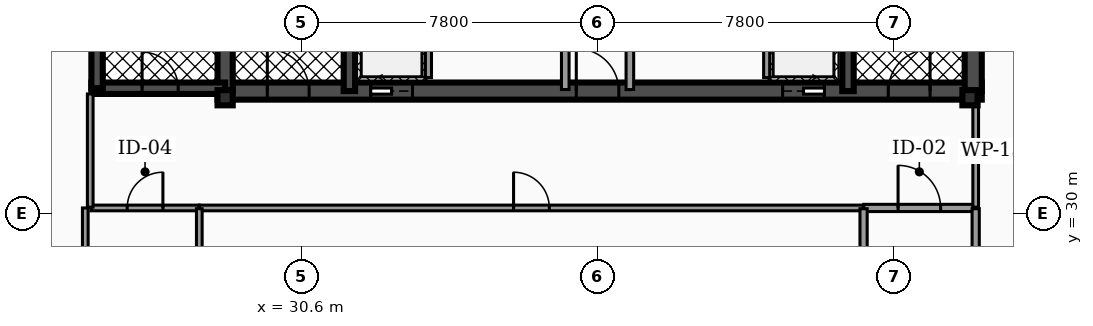
"""IFC4 building model, lengths in metres.
Left out: names, types, materials, properties, quantities, classifications, styles, units other than length and angle.
Written with IfcOpenShell. Run it as: python <this file> out.ifc"""

import sys

from ifc_helpers import new_model, si_unit, direction, frame, frame_2d, origin, origin_2d, place, context, subcontext, project, spatial, rectangle, hollow_rectangle, extrude, element, fill, save


model = new_model("IFC4")
c1 = context("Model", 3, precision=1e-05, world=origin(), true_north=direction((0.0, 1.0)))
c2 = subcontext(c1, "Body", "Model", "MODEL_VIEW")
j1 = project(units=[si_unit("LENGTHUNIT", "METRE"), si_unit("PLANEANGLEUNIT", "RADIAN")], contexts=[c1])
p1 = place(None, origin())
s1 = spatial("IfcSite", under=j1, at=p1, CompositionType="ELEMENT")
p2 = place(p1, origin())
s2 = spatial("IfcBuilding", under=s1, at=p2, CompositionType="ELEMENT")
p3 = place(p2, frame((0.0, 0.0, -4.08)))
s3 = spatial("IfcBuildingStorey", under=s2, at=p3, CompositionType="ELEMENT", Elevation=-4.08)
p4 = place(p3, frame((28.4, 33.225, 0.0), z_axis=(0.0, 0.0, 1.0), x_axis=(1.0, 0.0, 0.0)))
e1 = element("IfcWall", 1, at=p4, inside=s3, PredefinedType="SHEAR", context=c2, shape_type="SweptSolid", body=[
    extrude(rectangle(XDim=20.11, YDim=0.45, at=frame_2d((10.055, 0.0))), origin(), (0.0, 0.0, 1.0), 3.76),
])
p5 = place(p4, frame((4.03, 0.0, 0.0)))
e2 = element("IfcOpeningElement", 2, at=p5, cuts=e1, PredefinedType="OPENING", context=c2, shape_type="SweptSolid", body=[
    extrude(rectangle(XDim=1.1, YDim=2.15, at=frame_2d((0.55, 1.075))), frame((0.0, 0.235, 0.0), z_axis=(0.0, -1.0, 0.0), x_axis=(1.0, 0.0, 0.0)), (0.0, 0.0, 1.0), 0.47),
])
p6 = place(p4, frame((14.87, 0.0, 0.0)))
e3 = element("IfcOpeningElement", 3, at=p6, cuts=e1, PredefinedType="OPENING", context=c2, shape_type="SweptSolid", body=[
    extrude(rectangle(XDim=1.1, YDim=2.15, at=frame_2d((0.55, 1.075))), frame((0.0, 0.235, 0.0), z_axis=(0.0, -1.0, 0.0), x_axis=(1.0, 0.0, 0.0)), (0.0, 0.0, 1.0), 0.47),
])
p7 = place(p4, frame((1.31, 0.0, 0.0)))
e4 = element("IfcOpeningElement", 4, at=p7, cuts=e1, PredefinedType="OPENING", context=c2, shape_type="SweptSolid", body=[
    extrude(rectangle(XDim=1.1, YDim=2.2, at=frame_2d((0.55, 1.1))), frame((0.0, 0.235, 0.0), z_axis=(0.0, -1.0, 0.0), x_axis=(1.0, 0.0, 0.0)), (0.0, 0.0, 1.0), 0.47),
])
p8 = place(p4, frame((9.44, 0.0, 0.0)))
e5 = element("IfcOpeningElement", 5, at=p8, cuts=e1, PredefinedType="OPENING", context=c2, shape_type="SweptSolid", body=[
    extrude(rectangle(XDim=1.12, YDim=2.05, at=frame_2d((0.56, 1.025))), frame((0.0, 0.235, 0.0), z_axis=(0.0, -1.0, 0.0), x_axis=(1.0, 0.0, 0.0)), (0.0, 0.0, 1.0), 0.47),
])
p9 = place(p4, frame((17.65, 0.0, 0.0)))
e6 = element("IfcOpeningElement", 6, at=p9, cuts=e1, PredefinedType="OPENING", context=c2, shape_type="SweptSolid", body=[
    extrude(rectangle(XDim=1.1, YDim=2.2, at=frame_2d((0.55, 1.1))), frame((0.0, 0.235, 0.0), z_axis=(0.0, -1.0, 0.0), x_axis=(1.0, 0.0, 0.0)), (0.0, 0.0, 1.0), 0.47),
])
p10 = place(p3, frame((28.6, 33.225, 0.0), z_axis=(0.0, 0.0, 1.0), x_axis=(0.0, 1.0, 0.0)))
e7 = element("IfcWall", 7, at=p10, inside=s3, PredefinedType="SHEAR", context=c2, shape_type="SweptSolid", body=[
    extrude(rectangle(XDim=10.25, YDim=0.4, at=frame_2d((5.125, 0.0))), origin(), (0.0, 0.0, 1.0), 3.76),
])
for number, where, z_axis, x_axis in (
    (8, (31.87, 33.225, 0.0), (0.0, 0.0, 1.0), (0.0, 1.0, 0.0)),
    (9, (44.99, 33.225, 0.0), (0.0, 0.0, 1.0), (0.0, 1.0, 0.0)),
):
    element("IfcWall", number, at=place(p3, frame(where, z_axis=z_axis, x_axis=x_axis)), inside=s3, PredefinedType="SHEAR", context=c2, shape_type="SweptSolid", body=[
        extrude(rectangle(XDim=10.25, YDim=0.3, at=frame_2d((5.125, 0.0))), origin(), (0.0, 0.0, 1.0), 3.76),
    ])
p11 = place(p3, frame((48.285, 33.225, 0.0), z_axis=(0.0, 0.0, 1.0), x_axis=(0.0, 1.0, 0.0)))
e10 = element("IfcWall", 10, at=p11, inside=s3, PredefinedType="SHEAR", context=c2, shape_type="SweptSolid", body=[
    extrude(rectangle(XDim=10.25, YDim=0.45, at=frame_2d((5.125, 0.0))), origin(), (0.0, 0.0, 1.0), 3.76),
])
p12 = place(p3, frame((25.08, 33.3, 0.0), z_axis=(0.0, 0.0, 1.0), x_axis=(1.0, 0.0, 0.0)))
e11 = element("IfcWall", 11, at=p12, inside=s3, PredefinedType="SHEAR", context=c2, shape_type="SweptSolid", body=[
    extrude(rectangle(XDim=3.52, YDim=0.3, at=frame_2d((1.76, 0.0))), origin(), (0.0, 0.0, 1.0), 3.76),
])
p13 = place(p12, frame((1.335, 0.0, 0.0)))
e12 = element("IfcOpeningElement", 12, at=p13, cuts=e11, PredefinedType="OPENING", context=c2, shape_type="SweptSolid", body=[
    extrude(rectangle(XDim=0.95, YDim=2.2, at=frame_2d((0.475, 1.1))), frame((0.0, 0.16, 0.0), z_axis=(0.0, -1.0, 0.0), x_axis=(1.0, 0.0, 0.0)), (0.0, 0.0, 1.0), 0.32),
])
p14 = place(p3, frame((25.23, 33.3, 0.0), z_axis=(0.0, 0.0, 1.0), x_axis=(0.0, 1.0, 0.0)))
e13 = element("IfcWall", 13, at=p14, inside=s3, PredefinedType="SHEAR", context=c2, shape_type="SweptSolid", body=[
    extrude(rectangle(XDim=7.6, YDim=0.3, at=frame_2d((3.8, 0.0))), origin(), (0.0, 0.0, 1.0), 3.76),
])
for number, where, z_axis, x_axis in (
    (14, (28.6, 33.05, 0.0), (0.0, 0.0, 1.0), (1.0, 0.0, 0.0)),
    (15, (48.2, 33.05, 0.0), (0.0, 0.0, 1.0), (1.0, 0.0, 0.0)),
):
    element("IfcColumn", number, at=place(p3, frame(where, z_axis=z_axis, x_axis=x_axis)), inside=s3, PredefinedType="PILASTER", context=c2, shape_type="SweptSolid", body=[
        extrude(hollow_rectangle(XDim=0.4, YDim=0.4, WallThickness=0.02, at=origin_2d()), origin(), (0.0, 0.0, 1.0), 3.76),
    ])
for number, where, z_axis, x_axis in (
    (16, (33.95, 33.58, 0.0), (0.0, 0.0, 1.0), (0.0, 1.0, 0.0)),
    (17, (42.85, 33.58, 0.0), (0.0, 0.0, 1.0), (0.0, 1.0, 0.0)),
):
    element("IfcWall", number, at=place(p3, frame(where, z_axis=z_axis, x_axis=x_axis)), inside=s3, PredefinedType="SOLIDWALL", context=c2, shape_type="SweptSolid", body=[
        extrude(rectangle(XDim=2.45, YDim=0.16, at=frame_2d((1.225, 0.0))), origin(), (0.0, 0.0, 1.0), 2.732),
    ])
p15 = place(p3, frame((37.55, 33.265, 0.0), z_axis=(0.0, 0.0, 1.0), x_axis=(0.0, 1.0, 0.0)))
e18 = element("IfcWall", 18, at=p15, inside=s3, PredefinedType="PARTITIONING", context=c2, shape_type="SweptSolid", body=[
    extrude(rectangle(XDim=4.265, YDim=0.2, at=frame_2d((2.133, 0.0))), origin(), (0.0, 0.0, 1.0), 2.717),
])
p16 = place(p15, frame((1.692, 0.0, 0.0)))
e19 = element("IfcOpeningElement", 19, at=p16, cuts=e18, PredefinedType="OPENING", context=c2, shape_type="SweptSolid", body=[
    extrude(rectangle(XDim=0.88, YDim=2.05, at=frame_2d((0.44, 1.025))), frame((0.0, 0.11, 0.0), z_axis=(0.0, -1.0, 0.0), x_axis=(1.0, 0.0, 0.0)), (0.0, 0.0, 1.0), 0.22),
])
p17 = place(p3, frame((39.25, 33.265, 0.0), z_axis=(0.0, 0.0, 1.0), x_axis=(0.0, 1.0, 0.0)))
e20 = element("IfcWall", 20, at=p17, inside=s3, PredefinedType="PARTITIONING", context=c2, shape_type="SweptSolid", body=[
    extrude(rectangle(XDim=4.265, YDim=0.2, at=frame_2d((2.133, 0.0))), origin(), (0.0, 0.0, 1.0), 2.717),
])
p18 = place(p17, frame((1.692, 0.0, 0.0)))
e21 = element("IfcOpeningElement", 21, at=p18, cuts=e20, PredefinedType="OPENING", context=c2, shape_type="SweptSolid", body=[
    extrude(rectangle(XDim=0.88, YDim=2.05, at=frame_2d((0.44, 1.025))), frame((0.0, 0.11, 0.0), z_axis=(0.0, -1.0, 0.0), x_axis=(1.0, 0.0, 0.0)), (0.0, 0.0, 1.0), 0.22),
])
p19 = place(p3, frame((45.405, 30.15, 0.0), z_axis=(0.0, 0.0, 1.0), x_axis=(1.0, 0.0, 0.0)))
e22 = element("IfcWall", 22, at=p19, inside=s3, PredefinedType="PARTITIONING", context=c2, shape_type="SweptSolid", body=[
    extrude(rectangle(XDim=2.925, YDim=0.19, at=frame_2d((1.462, 0.0))), origin(), (0.0, 0.0, 1.0), 2.717),
])
p20 = place(p19, frame((0.903, 0.0, 0.0)))
e23 = element("IfcOpeningElement", 23, at=p20, cuts=e22, PredefinedType="OPENING", context=c2, shape_type="SweptSolid", body=[
    extrude(rectangle(XDim=1.12, YDim=2.05, at=frame_2d((0.56, 1.025))), frame((0.0, 0.105, 0.0), z_axis=(0.0, -1.0, 0.0), x_axis=(1.0, 0.0, 0.0)), (0.0, 0.0, 1.0), 0.21),
])
p21 = place(p3, frame((25.07, 30.15, 0.0), z_axis=(0.0, 0.0, 1.0), x_axis=(1.0, 0.0, 0.0)))
e24 = element("IfcWall", 24, at=p21, inside=s3, PredefinedType="PARTITIONING", context=c2, shape_type="SweptSolid", body=[
    extrude(rectangle(XDim=2.845, YDim=0.15, at=frame_2d((1.422, 0.0))), origin(), (0.0, 0.0, 1.0), 2.717),
])
p22 = place(p21, frame((0.952, 0.0, 0.0)))
e25 = element("IfcOpeningElement", 25, at=p22, cuts=e24, PredefinedType="OPENING", context=c2, shape_type="SweptSolid", body=[
    extrude(rectangle(XDim=0.94, YDim=2.05, at=frame_2d((0.47, 1.025))), frame((0.0, 0.085, 0.0), z_axis=(0.0, -1.0, 0.0), x_axis=(1.0, 0.0, 0.0)), (0.0, 0.0, 1.0), 0.17),
])
p23 = place(p3, frame((48.35, 30.17, 0.0), z_axis=(0.0, 0.0, 1.0), x_axis=(0.0, 1.0, 0.0)))
e26 = element("IfcWall", 26, at=p23, inside=s3, PredefinedType="PARTITIONING", context=c2, shape_type="SweptSolid", body=[
    extrude(rectangle(XDim=2.975, YDim=0.15, at=frame_2d((1.488, 0.0))), origin(), (0.0, 0.0, 1.0), 2.717),
])
p24 = place(p3, frame((27.925, 30.15, 0.0), z_axis=(0.0, 0.0, 1.0), x_axis=(1.0, 0.0, 0.0)))
e27 = element("IfcWall", 27, at=p24, inside=s3, PredefinedType="PARTITIONING", context=c2, shape_type="SweptSolid", body=[
    extrude(rectangle(XDim=17.47, YDim=0.15, at=frame_2d((8.735, 0.0))), origin(), (0.0, 0.0, 1.0), 2.717),
])
p25 = place(p24, frame((8.265, 0.0, 0.0)))
e28 = element("IfcOpeningElement", 28, at=p25, cuts=e27, PredefinedType="OPENING", context=c2, shape_type="SweptSolid", body=[
    extrude(rectangle(XDim=0.94, YDim=2.05, at=frame_2d((0.47, 1.025))), frame((0.0, 0.085, 0.0), z_axis=(0.0, -1.0, 0.0), x_axis=(1.0, 0.0, 0.0)), (0.0, 0.0, 1.0), 0.17),
])
p26 = place(p3, frame((25.05, 30.17, 0.0), z_axis=(0.0, 0.0, 1.0), x_axis=(0.0, 1.0, 0.0)))
e29 = element("IfcWall", 29, at=p26, inside=s3, PredefinedType="PARTITIONING", context=c2, shape_type="SweptSolid", body=[
    extrude(rectangle(XDim=2.98, YDim=0.15, at=frame_2d((1.49, 0.0))), origin(), (0.0, 0.0, 1.0), 2.717),
])
for number, where, z_axis, x_axis in (
    (30, (45.4, 27.37, 0.0), (0.0, 0.0, 1.0), (0.0, 1.0, 0.0)),
    (31, (48.35, 27.37, 0.0), (0.0, 0.0, 1.0), (0.0, 1.0, 0.0)),
):
    element("IfcWall", number, at=place(p3, frame(where, z_axis=z_axis, x_axis=x_axis)), inside=s3, PredefinedType="PARTITIONING", context=c2, shape_type="SweptSolid", body=[
        extrude(rectangle(XDim=2.76, YDim=0.19, at=frame_2d((1.38, 0.0))), origin(), (0.0, 0.0, 1.0), 2.717),
    ])
p27 = place(p3, frame((24.92, 27.57, 0.0), z_axis=(0.0, 0.0, 1.0), x_axis=(0.0, 1.0, 0.0)))
e32 = element("IfcWall", 32, at=p27, inside=s3, PredefinedType="PARTITIONING", context=c2, shape_type="SweptSolid", body=[
    extrude(rectangle(XDim=2.58, YDim=0.15, at=frame_2d((1.29, 0.0))), origin(), (0.0, 0.0, 1.0), 2.717),
])
p28 = place(p3, frame((27.92, 27.57, 0.0), z_axis=(0.0, 0.0, 1.0), x_axis=(0.0, 1.0, 0.0)))
e33 = element("IfcWall", 33, at=p28, inside=s3, PredefinedType="PARTITIONING", context=c2, shape_type="SweptSolid", body=[
    extrude(rectangle(XDim=2.56, YDim=0.15, at=frame_2d((1.28, 0.0))), origin(), (0.0, 0.0, 1.0), 2.717),
])
p29 = place(p5, origin())
e34 = element("IfcDoor", 34, at=p29, inside=s3, OperationType="SLIDING_TO_LEFT", PredefinedType="DOOR", context=c2, shape_type="SweptSolid", body=[
    extrude(rectangle(XDim=1.1, YDim=2.15, at=frame_2d((0.55, 1.075))), frame((0.0, 0.025, 0.0), z_axis=(0.0, -1.0, 0.0), x_axis=(1.0, 0.0, 0.0)), (0.0, 0.0, 1.0), 0.05),
])
fill(e2, e34)
p30 = place(p6, origin())
e35 = element("IfcDoor", 35, at=p30, inside=s3, OperationType="SLIDING_TO_RIGHT", PredefinedType="DOOR", context=c2, shape_type="SweptSolid", body=[
    extrude(rectangle(XDim=1.1, YDim=2.15, at=frame_2d((0.55, 1.075))), frame((0.0, 0.025, 0.0), z_axis=(0.0, -1.0, 0.0), x_axis=(1.0, 0.0, 0.0)), (0.0, 0.0, 1.0), 0.05),
])
fill(e3, e35)
p31 = place(p7, origin())
e36 = element("IfcDoor", 36, at=p31, inside=s3, OperationType="SINGLE_SWING_LEFT", PredefinedType="DOOR", context=c2, shape_type="SweptSolid", body=[
    extrude(rectangle(XDim=1.1, YDim=2.2, at=frame_2d((0.55, 1.1))), frame((0.0, 0.025, 0.0), z_axis=(0.0, -1.0, 0.0), x_axis=(1.0, 0.0, 0.0)), (0.0, 0.0, 1.0), 0.05),
])
fill(e4, e36)
p32 = place(p8, origin())
e37 = element("IfcDoor", 37, at=p32, inside=s3, OperationType="SINGLE_SWING_LEFT", PredefinedType="DOOR", context=c2, shape_type="SweptSolid", body=[
    extrude(rectangle(XDim=1.12, YDim=2.05, at=frame_2d((0.56, 1.025))), frame((0.0, 0.025, 0.0), z_axis=(0.0, -1.0, 0.0), x_axis=(1.0, 0.0, 0.0)), (0.0, 0.0, 1.0), 0.05),
])
fill(e5, e37)
p33 = place(p9, origin())
e38 = element("IfcDoor", 38, at=p33, inside=s3, OperationType="SINGLE_SWING_RIGHT", PredefinedType="DOOR", context=c2, shape_type="SweptSolid", body=[
    extrude(rectangle(XDim=1.1, YDim=2.2, at=frame_2d((0.55, 1.1))), frame((0.0, 0.025, 0.0), z_axis=(0.0, -1.0, 0.0), x_axis=(1.0, 0.0, 0.0)), (0.0, 0.0, 1.0), 0.05),
])
fill(e6, e38)
p34 = place(p13, origin())
e39 = element("IfcDoor", 39, at=p34, inside=s3, OperationType="SINGLE_SWING_LEFT", PredefinedType="DOOR", context=c2, shape_type="SweptSolid", body=[
    extrude(rectangle(XDim=0.95, YDim=2.2, at=frame_2d((0.475, 1.1))), frame((0.0, 0.025, 0.0), z_axis=(0.0, -1.0, 0.0), x_axis=(1.0, 0.0, 0.0)), (0.0, 0.0, 1.0), 0.05),
])
fill(e12, e39)
p35 = place(p20, origin())
e40 = element("IfcDoor", 40, at=p35, inside=s3, OperationType="SINGLE_SWING_LEFT", PredefinedType="DOOR", context=c2, shape_type="SweptSolid", body=[
    extrude(rectangle(XDim=1.12, YDim=2.05, at=frame_2d((0.56, 1.025))), frame((0.0, 0.025, 0.0), z_axis=(0.0, -1.0, 0.0), x_axis=(1.0, 0.0, 0.0)), (0.0, 0.0, 1.0), 0.05),
])
fill(e23, e40)
p36 = place(p22, origin())
e41 = element("IfcDoor", 41, at=p36, inside=s3, OperationType="SINGLE_SWING_RIGHT", PredefinedType="DOOR", context=c2, shape_type="SweptSolid", body=[
    extrude(rectangle(XDim=0.94, YDim=2.05, at=frame_2d((0.47, 1.025))), frame((0.0, 0.025, 0.0), z_axis=(0.0, -1.0, 0.0), x_axis=(1.0, 0.0, 0.0)), (0.0, 0.0, 1.0), 0.05),
])
fill(e25, e41)
p37 = place(p25, origin())
e42 = element("IfcDoor", 42, at=p37, inside=s3, OperationType="SINGLE_SWING_LEFT", PredefinedType="DOOR", context=c2, shape_type="SweptSolid", body=[
    extrude(rectangle(XDim=0.94, YDim=2.05, at=frame_2d((0.47, 1.025))), frame((0.0, 0.025, 0.0), z_axis=(0.0, -1.0, 0.0), x_axis=(1.0, 0.0, 0.0)), (0.0, 0.0, 1.0), 0.05),
])
fill(e28, e42)
save(model, sys.argv[1])
